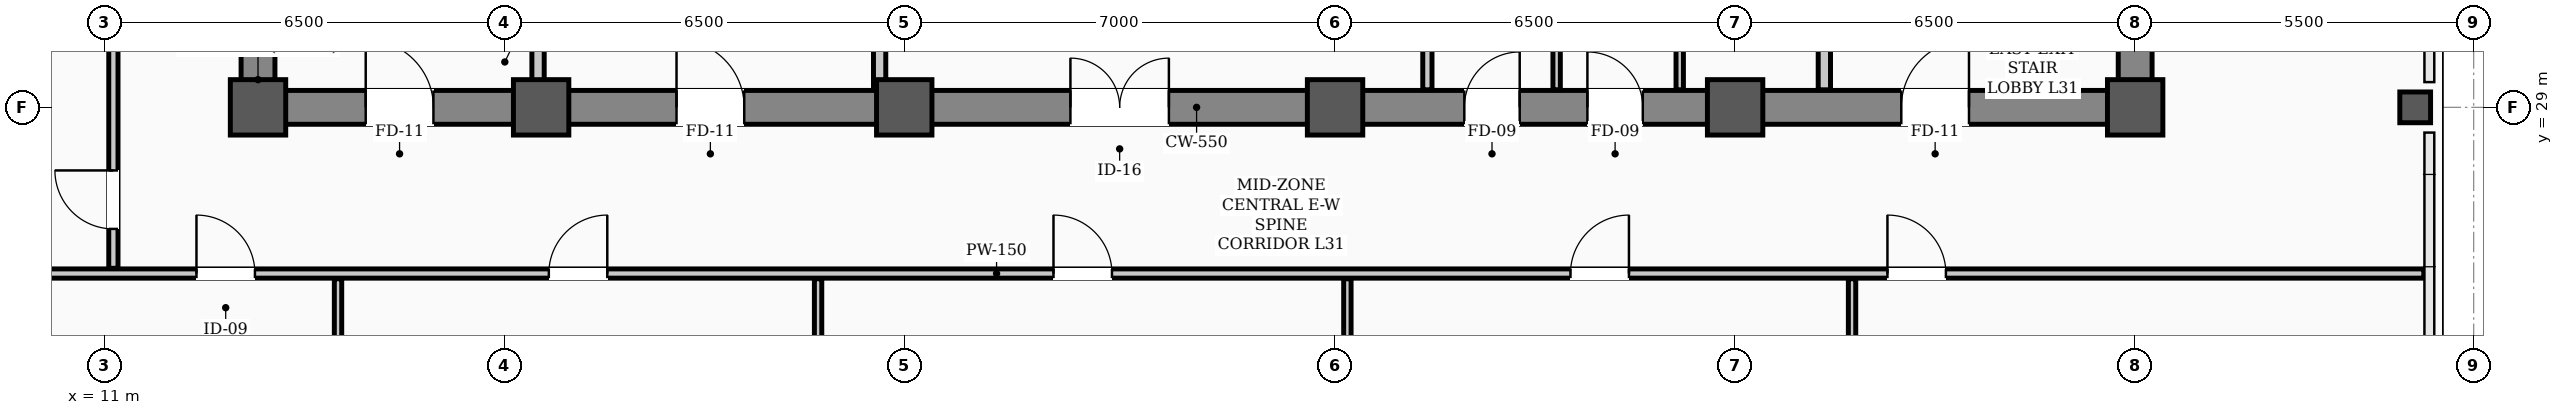
"""IFC4 building model, lengths in metres.
Left out: names, types, materials, properties, quantities, classifications, styles, units other than length and angle.
Written with IfcOpenShell. Run it as: python <this file> out.ifc"""

import sys

from ifc_helpers import new_model, si_unit, direction, frame, frame_2d, origin, origin_2d, place, context, subcontext, project, spatial, rectangle, hollow_rectangle, extrude, element, fill, save


model = new_model("IFC4")
c1 = context("Model", 3, precision=1e-05, world=origin(), true_north=direction((0.0, 1.0)))
c2 = subcontext(c1, "Body", "Model", "MODEL_VIEW")
j1 = project(units=[si_unit("LENGTHUNIT", "METRE"), si_unit("PLANEANGLEUNIT", "RADIAN")], contexts=[c1])
p1 = place(None, origin())
s1 = spatial("IfcSite", under=j1, at=p1, CompositionType="ELEMENT")
p2 = place(p1, origin())
s2 = spatial("IfcBuilding", under=s1, at=p2, CompositionType="ELEMENT")
p3 = place(p2, frame((0.0, 0.0, 126.6)))
s3 = spatial("IfcBuildingStorey", under=s2, at=p3, CompositionType="ELEMENT", Elevation=126.6)
for number, where, z_axis, x_axis in (
    (1, (13.5, 29.0, 0.0), (0.0, 0.0, 1.0), (1.0, 0.0, 0.0)),
    (2, (18.1, 29.0, 0.0), (0.0, 0.0, 1.0), (1.0, 0.0, 0.0)),
    (3, (24.0, 29.0, 0.0), (0.0, 0.0, 1.0), (1.0, 0.0, 0.0)),
    (4, (31.0, 29.0, 0.0), (0.0, 0.0, 1.0), (1.0, 0.0, 0.0)),
    (5, (37.5, 29.0, 0.0), (0.0, 0.0, 1.0), (1.0, 0.0, 0.0)),
    (6, (44.0, 29.0, 0.0), (0.0, 0.0, 1.0), (1.0, 0.0, 0.0)),
):
    element("IfcColumn", number, at=place(p3, frame(where, z_axis=z_axis, x_axis=x_axis)), inside=s3, PredefinedType="COLUMN", context=c2, shape_type="SweptSolid", body=[
        extrude(hollow_rectangle(XDim=0.9, YDim=0.9, WallThickness=0.035, InnerFilletRadius=0.017, OuterFilletRadius=0.052, at=origin_2d()), origin(), (0.0, 0.0, 1.0), 3.9),
    ])
p4 = place(p3, frame((48.55, 29.0, 0.0), z_axis=(0.0, 0.0, 1.0), x_axis=(1.0, 0.0, 0.0)))
e7 = element("IfcColumn", 7, at=p4, inside=s3, PredefinedType="COLUMN", context=c2, shape_type="SweptSolid", body=[
    extrude(hollow_rectangle(XDim=0.5, YDim=0.5, WallThickness=0.024, InnerFilletRadius=0.012, OuterFilletRadius=0.036, at=origin_2d()), origin(), (0.0, 0.0, 1.0), 3.9),
])
p5 = place(p3, frame((13.5, 29.0, 0.0), z_axis=(0.0, 0.0, 1.0), x_axis=(1.0, 0.0, 0.0)))
e8 = element("IfcWall", 8, at=p5, inside=s3, PredefinedType="SHEAR", context=c2, shape_type="SweptSolid", body=[
    extrude(rectangle(XDim=30.5, YDim=0.55, at=frame_2d((15.25, 0.0))), origin(), (0.0, 0.0, 1.0), 3.72),
])
p6 = place(p5, frame((1.75, 0.0, 0.0)))
e9 = element("IfcOpeningElement", 9, at=p6, cuts=e8, PredefinedType="OPENING", context=c2, shape_type="SweptSolid", body=[
    extrude(rectangle(XDim=1.1, YDim=2.08, at=frame_2d((0.55, 1.04))), frame((0.0, 0.285, 0.0), z_axis=(0.0, -1.0, 0.0), x_axis=(1.0, 0.0, 0.0)), (0.0, 0.0, 1.0), 0.57),
])
p7 = place(p5, frame((26.7, 0.0, 0.0)))
e10 = element("IfcOpeningElement", 10, at=p7, cuts=e8, PredefinedType="OPENING", context=c2, shape_type="SweptSolid", body=[
    extrude(rectangle(XDim=1.1, YDim=2.08, at=frame_2d((0.55, 1.04))), frame((0.0, 0.285, 0.0), z_axis=(0.0, -1.0, 0.0), x_axis=(1.0, 0.0, 0.0)), (0.0, 0.0, 1.0), 0.57),
])
p8 = place(p5, frame((6.8, 0.0, 0.0)))
e11 = element("IfcOpeningElement", 11, at=p8, cuts=e8, PredefinedType="OPENING", context=c2, shape_type="SweptSolid", body=[
    extrude(rectangle(XDim=1.1, YDim=2.08, at=frame_2d((0.55, 1.04))), frame((0.0, 0.285, 0.0), z_axis=(0.0, -1.0, 0.0), x_axis=(1.0, 0.0, 0.0)), (0.0, 0.0, 1.0), 0.57),
])
p9 = place(p5, frame((13.2, 0.0, 0.0)))
e12 = element("IfcOpeningElement", 12, at=p9, cuts=e8, PredefinedType="OPENING", context=c2, shape_type="SweptSolid", body=[
    extrude(rectangle(XDim=1.6, YDim=2.08, at=frame_2d((0.8, 1.04))), frame((0.0, 0.285, 0.0), z_axis=(0.0, -1.0, 0.0), x_axis=(1.0, 0.0, 0.0)), (0.0, 0.0, 1.0), 0.57),
])
p10 = place(p5, frame((19.6, 0.0, 0.0)))
e13 = element("IfcOpeningElement", 13, at=p10, cuts=e8, PredefinedType="OPENING", context=c2, shape_type="SweptSolid", body=[
    extrude(rectangle(XDim=0.9, YDim=2.08, at=frame_2d((0.45, 1.04))), frame((0.0, 0.285, 0.0), z_axis=(0.0, -1.0, 0.0), x_axis=(1.0, 0.0, 0.0)), (0.0, 0.0, 1.0), 0.57),
])
p11 = place(p5, frame((21.6, 0.0, 0.0)))
e14 = element("IfcOpeningElement", 14, at=p11, cuts=e8, PredefinedType="OPENING", context=c2, shape_type="SweptSolid", body=[
    extrude(rectangle(XDim=0.9, YDim=2.08, at=frame_2d((0.45, 1.04))), frame((0.0, 0.285, 0.0), z_axis=(0.0, -1.0, 0.0), x_axis=(1.0, 0.0, 0.0)), (0.0, 0.0, 1.0), 0.57),
])
for number, where, z_axis, x_axis in (
    (15, (13.5, 29.35, 0.0), (0.0, 0.0, 1.0), (0.0, 1.0, 0.0)),
    (16, (44.0, 29.35, 0.0), (0.0, 0.0, 1.0), (0.0, 1.0, 0.0)),
):
    element("IfcWall", number, at=place(p3, frame(where, z_axis=z_axis, x_axis=x_axis)), inside=s3, PredefinedType="SHEAR", context=c2, shape_type="SweptSolid", body=[
        extrude(rectangle(XDim=8.6, YDim=0.55, at=frame_2d((4.3, 0.0))), origin(), (0.0, 0.0, 1.0), 3.72),
    ])
p12 = place(p3, frame((2.31, 26.3, 0.0), z_axis=(0.0, 0.0, 1.0), x_axis=(1.0, 0.0, 0.0)))
e17 = element("IfcWall", 17, at=p12, inside=s3, PredefinedType="PARTITIONING", context=c2, shape_type="SweptSolid", body=[
    extrude(rectangle(XDim=46.38, YDim=0.15, at=frame_2d((23.19, 0.0))), origin(), (0.0, 0.0, 1.0), 3.1),
])
p13 = place(p12, frame((10.19, 0.0, 0.0)))
e18 = element("IfcOpeningElement", 18, at=p13, cuts=e17, PredefinedType="OPENING", context=c2, shape_type="SweptSolid", body=[
    extrude(rectangle(XDim=0.95, YDim=2.08, at=frame_2d((0.475, 1.04))), frame((0.0, 0.085, 0.0), z_axis=(0.0, -1.0, 0.0), x_axis=(1.0, 0.0, 0.0)), (0.0, 0.0, 1.0), 0.17),
])
p14 = place(p12, frame((15.915, 0.0, 0.0)))
e19 = element("IfcOpeningElement", 19, at=p14, cuts=e17, PredefinedType="OPENING", context=c2, shape_type="SweptSolid", body=[
    extrude(rectangle(XDim=0.95, YDim=2.08, at=frame_2d((0.475, 1.04))), frame((0.0, 0.085, 0.0), z_axis=(0.0, -1.0, 0.0), x_axis=(1.0, 0.0, 0.0)), (0.0, 0.0, 1.0), 0.17),
])
p15 = place(p12, frame((24.115, 0.0, 0.0)))
e20 = element("IfcOpeningElement", 20, at=p15, cuts=e17, PredefinedType="OPENING", context=c2, shape_type="SweptSolid", body=[
    extrude(rectangle(XDim=0.95, YDim=2.08, at=frame_2d((0.475, 1.04))), frame((0.0, 0.085, 0.0), z_axis=(0.0, -1.0, 0.0), x_axis=(1.0, 0.0, 0.0)), (0.0, 0.0, 1.0), 0.17),
])
p16 = place(p12, frame((32.515, 0.0, 0.0)))
e21 = element("IfcOpeningElement", 21, at=p16, cuts=e17, PredefinedType="OPENING", context=c2, shape_type="SweptSolid", body=[
    extrude(rectangle(XDim=0.95, YDim=2.08, at=frame_2d((0.475, 1.04))), frame((0.0, 0.085, 0.0), z_axis=(0.0, -1.0, 0.0), x_axis=(1.0, 0.0, 0.0)), (0.0, 0.0, 1.0), 0.17),
])
p17 = place(p12, frame((37.665, 0.0, 0.0)))
e22 = element("IfcOpeningElement", 22, at=p17, cuts=e17, PredefinedType="OPENING", context=c2, shape_type="SweptSolid", body=[
    extrude(rectangle(XDim=0.95, YDim=2.08, at=frame_2d((0.475, 1.04))), frame((0.0, 0.085, 0.0), z_axis=(0.0, -1.0, 0.0), x_axis=(1.0, 0.0, 0.0)), (0.0, 0.0, 1.0), 0.17),
])
for number, where, z_axis, x_axis in (
    (23, (18.05, 29.285, 0.0), (0.0, 0.0, 1.0), (0.0, 1.0, 0.0)),
    (24, (38.95, 29.285, 0.0), (0.0, 0.0, 1.0), (0.0, 1.0, 0.0)),
):
    element("IfcWall", number, at=place(p3, frame(where, z_axis=z_axis, x_axis=x_axis)), inside=s3, PredefinedType="STANDARD", context=c2, shape_type="SweptSolid", body=[
        extrude(rectangle(XDim=1.015, YDim=0.2, at=frame_2d((0.508, 0.0))), origin(), (0.0, 0.0, 1.0), 3.3),
    ])
p18 = place(p3, frame((23.6, 29.285, 0.0), z_axis=(0.0, 0.0, 1.0), x_axis=(0.0, 1.0, 0.0)))
e25 = element("IfcWall", 25, at=p18, inside=s3, PredefinedType="STANDARD", context=c2, shape_type="SweptSolid", body=[
    extrude(rectangle(XDim=5.415, YDim=0.2, at=frame_2d((2.708, 0.0))), origin(), (0.0, 0.0, 1.0), 3.1),
])
p19 = place(p3, frame((32.5, 29.285, 0.0), z_axis=(0.0, 0.0, 1.0), x_axis=(0.0, 1.0, 0.0)))
e26 = element("IfcWall", 26, at=p19, inside=s3, PredefinedType="PARTITIONING", context=c2, shape_type="SweptSolid", body=[
    extrude(rectangle(XDim=2.48, YDim=0.15, at=frame_2d((1.24, 0.0))), origin(), (0.0, 0.0, 1.0), 3.3),
])
for number, where, z_axis, x_axis in (
    (27, (36.6, 29.285, 0.0), (0.0, 0.0, 1.0), (0.0, 1.0, 0.0)),
    (28, (34.6, 29.285, 0.0), (0.0, 0.0, 1.0), (0.0, 1.0, 0.0)),
):
    element("IfcWall", number, at=place(p3, frame(where, z_axis=z_axis, x_axis=x_axis)), inside=s3, PredefinedType="PARTITIONING", context=c2, shape_type="SweptSolid", body=[
        extrude(rectangle(XDim=2.48, YDim=0.12, at=frame_2d((1.24, 0.0))), origin(), (0.0, 0.0, 1.0), 3.3),
    ])
p20 = place(p3, frame((11.15, 26.385, 0.0), z_axis=(0.0, 0.0, 1.0), x_axis=(0.0, 1.0, 0.0)))
e29 = element("IfcWall", 29, at=p20, inside=s3, PredefinedType="PARTITIONING", context=c2, shape_type="SweptSolid", body=[
    extrude(rectangle(XDim=11.28, YDim=0.15, at=frame_2d((5.64, 0.0))), origin(), (0.0, 0.0, 1.0), 3.0),
])
p21 = place(p20, frame((0.64, 0.0, 0.0)))
e30 = element("IfcOpeningElement", 30, at=p21, cuts=e29, PredefinedType="OPENING", context=c2, shape_type="SweptSolid", body=[
    extrude(rectangle(XDim=0.95, YDim=2.08, at=frame_2d((0.475, 1.04))), frame((0.0, 0.085, 0.0), z_axis=(0.0, -1.0, 0.0), x_axis=(1.0, 0.0, 0.0)), (0.0, 0.0, 1.0), 0.17),
])
p22 = place(p20, frame((8.615, 0.0, 0.0)))
e31 = element("IfcOpeningElement", 31, at=p22, cuts=e29, PredefinedType="OPENING", context=c2, shape_type="SweptSolid", body=[
    extrude(rectangle(XDim=0.95, YDim=2.08, at=frame_2d((0.475, 1.04))), frame((0.0, 0.085, 0.0), z_axis=(0.0, -1.0, 0.0), x_axis=(1.0, 0.0, 0.0)), (0.0, 0.0, 1.0), 0.17),
])
p23 = place(p3, frame((14.8, 10.81, 0.0), z_axis=(0.0, 0.0, 1.0), x_axis=(0.0, 1.0, 0.0)))
e32 = element("IfcWall", 32, at=p23, inside=s3, PredefinedType="PARTITIONING", context=c2, shape_type="SweptSolid", body=[
    extrude(rectangle(XDim=15.405, YDim=0.12, at=frame_2d((7.703, 0.0))), origin(), (0.0, 0.0, 1.0), 3.0),
])
p24 = place(p3, frame((22.6, 12.57, 0.0), z_axis=(0.0, 0.0, 1.0), x_axis=(0.0, 1.0, 0.0)))
e33 = element("IfcWall", 33, at=p24, inside=s3, PredefinedType="PARTITIONING", context=c2, shape_type="SweptSolid", body=[
    extrude(rectangle(XDim=13.645, YDim=0.12, at=frame_2d((6.823, 0.0))), origin(), (0.0, 0.0, 1.0), 3.0),
])
for number, where, z_axis, x_axis in (
    (34, (31.2, 10.81, 0.0), (0.0, 0.0, 1.0), (0.0, 1.0, 0.0)),
    (35, (39.4, 10.81, 0.0), (0.0, 0.0, 1.0), (0.0, 1.0, 0.0)),
):
    element("IfcWall", number, at=place(p3, frame(where, z_axis=z_axis, x_axis=x_axis)), inside=s3, PredefinedType="PARTITIONING", context=c2, shape_type="SweptSolid", body=[
        extrude(rectangle(XDim=15.405, YDim=0.12, at=frame_2d((7.703, 0.0))), origin(), (0.0, 0.0, 1.0), 3.0),
    ])
p25 = place(p6, origin())
e36 = element("IfcDoor", 36, at=p25, inside=s3, OperationType="SINGLE_SWING_LEFT", PredefinedType="DOOR", context=c2, shape_type="SweptSolid", body=[
    extrude(rectangle(XDim=1.1, YDim=2.08, at=frame_2d((0.55, 1.04))), frame((0.0, 0.025, 0.0), z_axis=(0.0, -1.0, 0.0), x_axis=(1.0, 0.0, 0.0)), (0.0, 0.0, 1.0), 0.05),
])
fill(e9, e36)
p26 = place(p7, origin())
e37 = element("IfcDoor", 37, at=p26, inside=s3, OperationType="SINGLE_SWING_RIGHT", PredefinedType="DOOR", context=c2, shape_type="SweptSolid", body=[
    extrude(rectangle(XDim=1.1, YDim=2.08, at=frame_2d((0.55, 1.04))), frame((0.0, 0.025, 0.0), z_axis=(0.0, -1.0, 0.0), x_axis=(1.0, 0.0, 0.0)), (0.0, 0.0, 1.0), 0.05),
])
fill(e10, e37)
p27 = place(p8, origin())
e38 = element("IfcDoor", 38, at=p27, inside=s3, OperationType="SINGLE_SWING_LEFT", PredefinedType="DOOR", context=c2, shape_type="SweptSolid", body=[
    extrude(rectangle(XDim=1.1, YDim=2.08, at=frame_2d((0.55, 1.04))), frame((0.0, 0.025, 0.0), z_axis=(0.0, -1.0, 0.0), x_axis=(1.0, 0.0, 0.0)), (0.0, 0.0, 1.0), 0.05),
])
fill(e11, e38)
p28 = place(p9, origin())
e39 = element("IfcDoor", 39, at=p28, inside=s3, OperationType="DOUBLE_DOOR_SINGLE_SWING", PredefinedType="DOOR", context=c2, shape_type="SweptSolid", body=[
    extrude(rectangle(XDim=1.6, YDim=2.08, at=frame_2d((0.8, 1.04))), frame((0.0, 0.025, 0.0), z_axis=(0.0, -1.0, 0.0), x_axis=(1.0, 0.0, 0.0)), (0.0, 0.0, 1.0), 0.05),
])
fill(e12, e39)
p29 = place(p10, origin())
e40 = element("IfcDoor", 40, at=p29, inside=s3, OperationType="SINGLE_SWING_RIGHT", PredefinedType="DOOR", context=c2, shape_type="SweptSolid", body=[
    extrude(rectangle(XDim=0.9, YDim=2.08, at=frame_2d((0.45, 1.04))), frame((0.0, 0.025, 0.0), z_axis=(0.0, -1.0, 0.0), x_axis=(1.0, 0.0, 0.0)), (0.0, 0.0, 1.0), 0.05),
])
fill(e13, e40)
p30 = place(p11, origin())
e41 = element("IfcDoor", 41, at=p30, inside=s3, OperationType="SINGLE_SWING_LEFT", PredefinedType="DOOR", context=c2, shape_type="SweptSolid", body=[
    extrude(rectangle(XDim=0.9, YDim=2.08, at=frame_2d((0.45, 1.04))), frame((0.0, 0.025, 0.0), z_axis=(0.0, -1.0, 0.0), x_axis=(1.0, 0.0, 0.0)), (0.0, 0.0, 1.0), 0.05),
])
fill(e14, e41)
p31 = place(p13, origin())
e42 = element("IfcDoor", 42, at=p31, inside=s3, OperationType="SINGLE_SWING_LEFT", PredefinedType="DOOR", context=c2, shape_type="SweptSolid", body=[
    extrude(rectangle(XDim=0.95, YDim=2.08, at=frame_2d((0.475, 1.04))), frame((0.0, 0.025, 0.0), z_axis=(0.0, -1.0, 0.0), x_axis=(1.0, 0.0, 0.0)), (0.0, 0.0, 1.0), 0.05),
])
fill(e18, e42)
p32 = place(p14, origin())
e43 = element("IfcDoor", 43, at=p32, inside=s3, OperationType="SINGLE_SWING_RIGHT", PredefinedType="DOOR", context=c2, shape_type="SweptSolid", body=[
    extrude(rectangle(XDim=0.95, YDim=2.08, at=frame_2d((0.475, 1.04))), frame((0.0, 0.025, 0.0), z_axis=(0.0, -1.0, 0.0), x_axis=(1.0, 0.0, 0.0)), (0.0, 0.0, 1.0), 0.05),
])
fill(e19, e43)
p33 = place(p15, origin())
e44 = element("IfcDoor", 44, at=p33, inside=s3, OperationType="SINGLE_SWING_LEFT", PredefinedType="DOOR", context=c2, shape_type="SweptSolid", body=[
    extrude(rectangle(XDim=0.95, YDim=2.08, at=frame_2d((0.475, 1.04))), frame((0.0, 0.025, 0.0), z_axis=(0.0, -1.0, 0.0), x_axis=(1.0, 0.0, 0.0)), (0.0, 0.0, 1.0), 0.05),
])
fill(e20, e44)
p34 = place(p16, origin())
e45 = element("IfcDoor", 45, at=p34, inside=s3, OperationType="SINGLE_SWING_RIGHT", PredefinedType="DOOR", context=c2, shape_type="SweptSolid", body=[
    extrude(rectangle(XDim=0.95, YDim=2.08, at=frame_2d((0.475, 1.04))), frame((0.0, 0.025, 0.0), z_axis=(0.0, -1.0, 0.0), x_axis=(1.0, 0.0, 0.0)), (0.0, 0.0, 1.0), 0.05),
])
fill(e21, e45)
p35 = place(p17, origin())
e46 = element("IfcDoor", 46, at=p35, inside=s3, OperationType="SINGLE_SWING_LEFT", PredefinedType="DOOR", context=c2, shape_type="SweptSolid", body=[
    extrude(rectangle(XDim=0.95, YDim=2.08, at=frame_2d((0.475, 1.04))), frame((0.0, 0.025, 0.0), z_axis=(0.0, -1.0, 0.0), x_axis=(1.0, 0.0, 0.0)), (0.0, 0.0, 1.0), 0.05),
])
fill(e22, e46)
p36 = place(p21, origin())
e47 = element("IfcDoor", 47, at=p36, inside=s3, OperationType="SINGLE_SWING_RIGHT", PredefinedType="DOOR", context=c2, shape_type="SweptSolid", body=[
    extrude(rectangle(XDim=0.95, YDim=2.08, at=frame_2d((0.475, 1.04))), frame((0.0, 0.025, 0.0), z_axis=(0.0, -1.0, 0.0), x_axis=(1.0, 0.0, 0.0)), (0.0, 0.0, 1.0), 0.05),
])
fill(e30, e47)
save(model, sys.argv[1])
